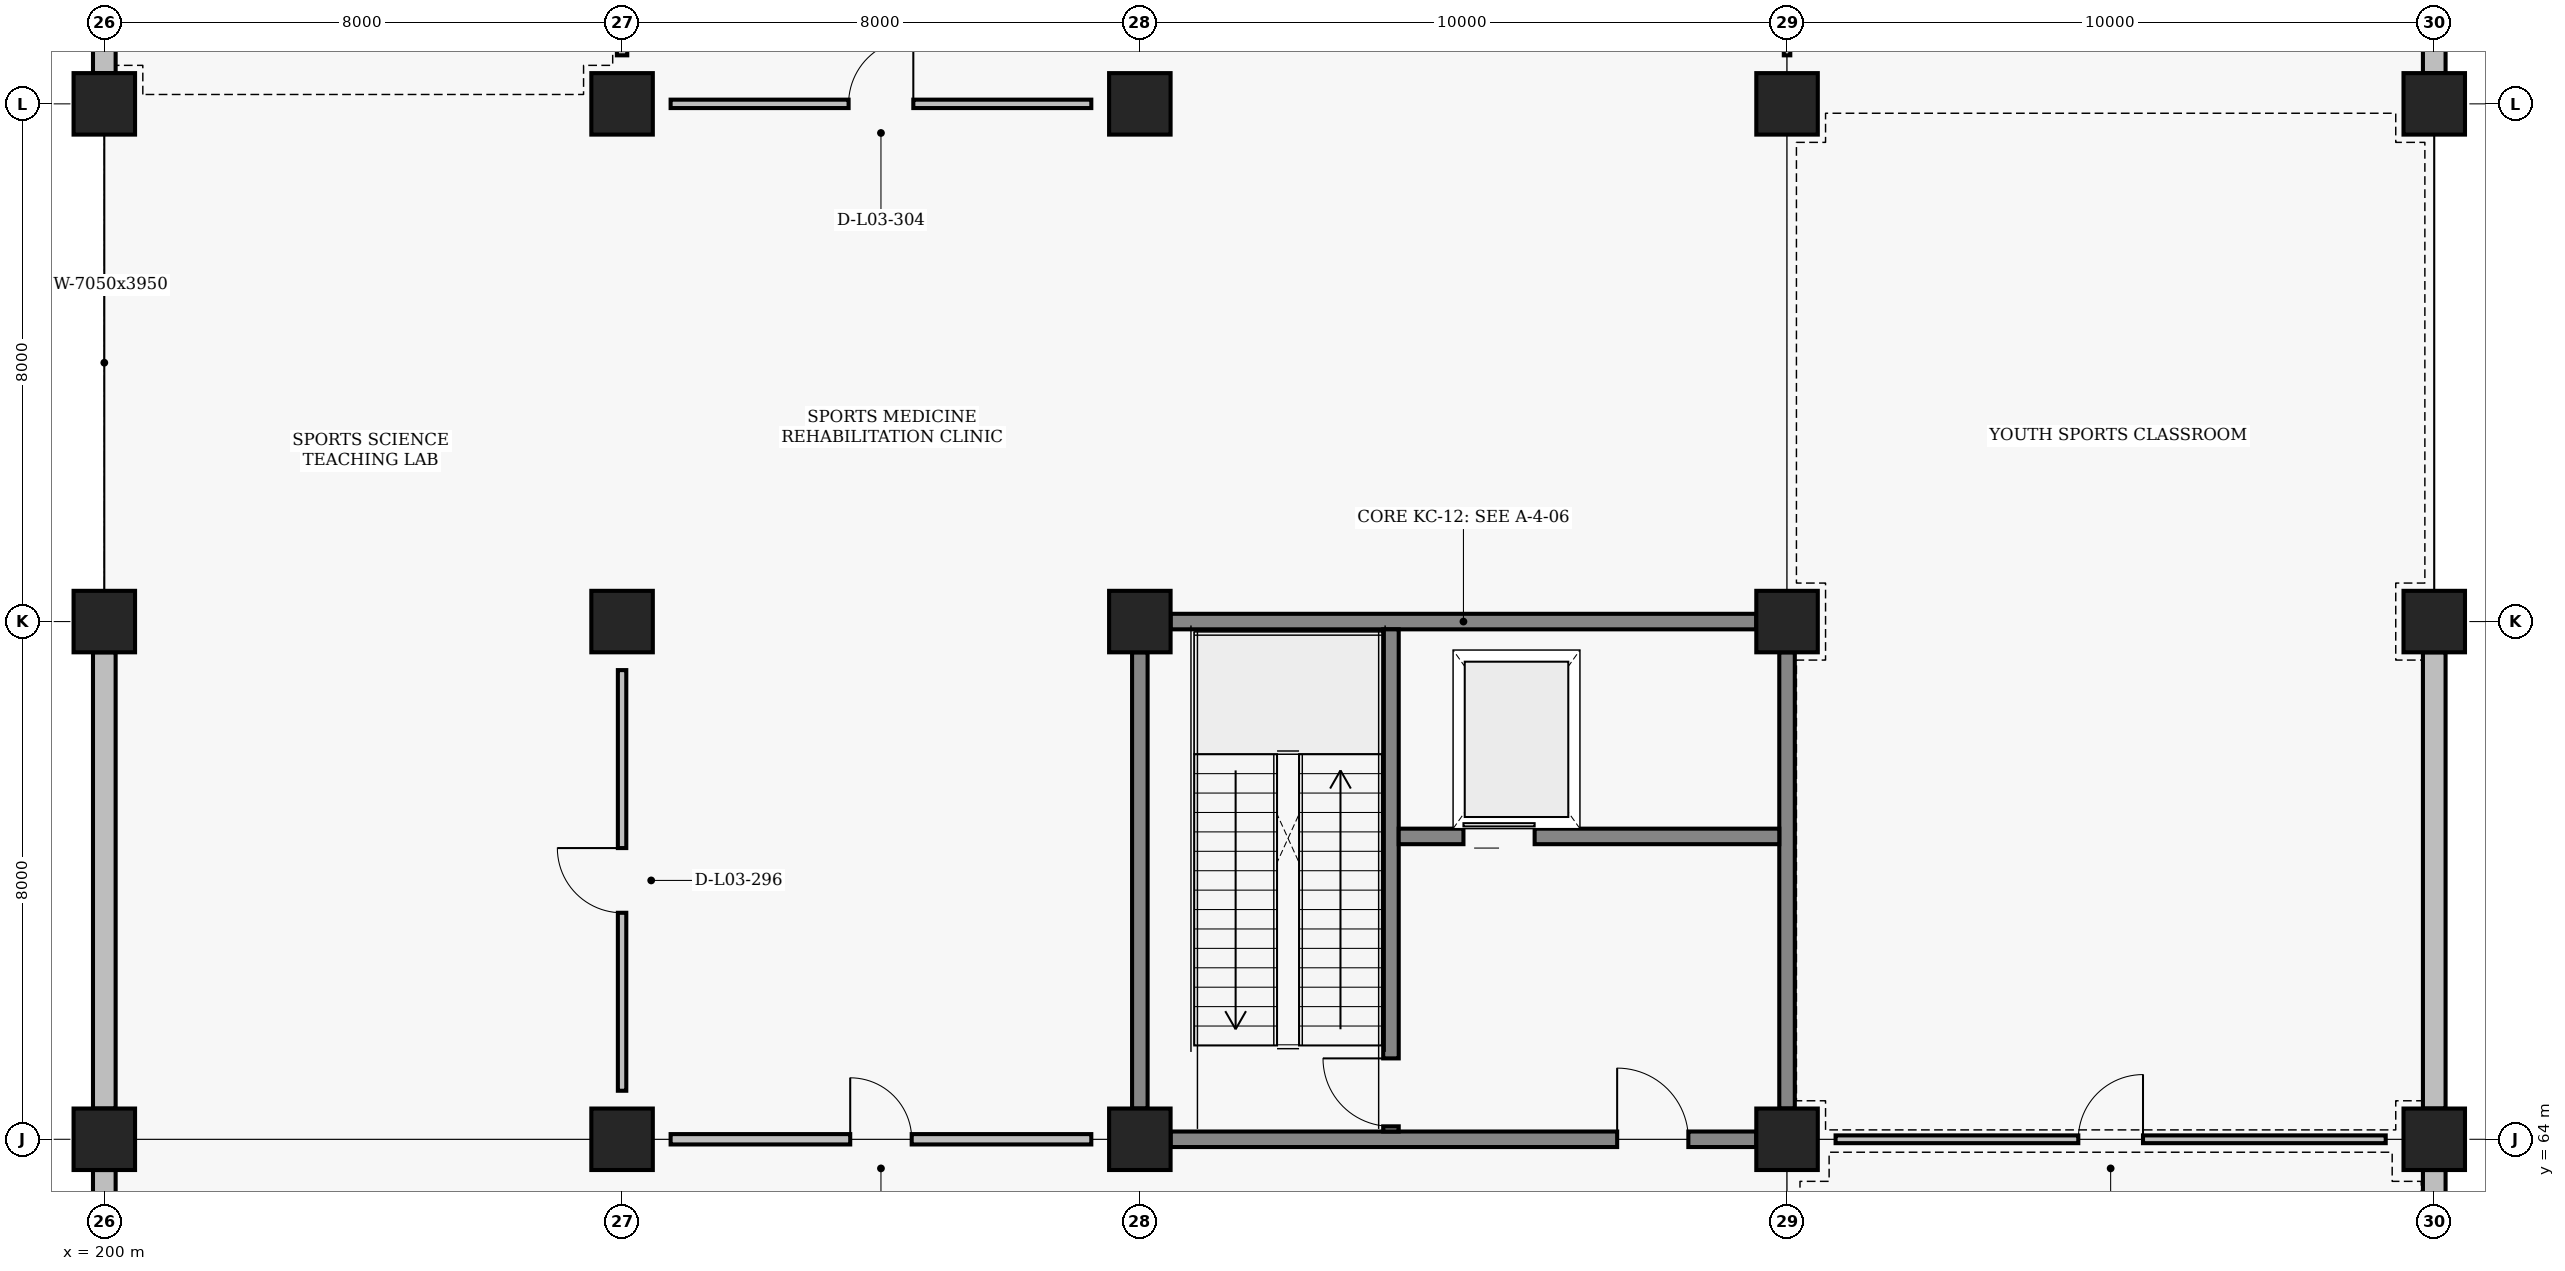
"""IFC4 building model, lengths in metres.
Left out: names, types, materials, properties, quantities, classifications, styles, units other than length and angle.
Written with IfcOpenShell. Run it as: python <this file> out.ifc"""

import sys

from ifc_helpers import new_model, si_unit, direction, frame, frame_2d, origin, origin_2d, place, context, subcontext, project, spatial, rectangle, extrude, element, fill, save


model = new_model("IFC4")
c1 = context("Model", 3, precision=1e-05, world=origin(), true_north=direction((0.0, 1.0)))
c2 = subcontext(c1, "Body", "Model", "MODEL_VIEW")
j1 = project(units=[si_unit("LENGTHUNIT", "METRE"), si_unit("PLANEANGLEUNIT", "RADIAN")], contexts=[c1])
p1 = place(None, origin())
s1 = spatial("IfcSite", under=j1, at=p1, CompositionType="ELEMENT")
p2 = place(p1, origin())
s2 = spatial("IfcBuilding", under=s1, at=p2, CompositionType="ELEMENT")
p3 = place(p2, frame((0.0, 0.0, 9.6)))
s3 = spatial("IfcBuildingStorey", under=s2, at=p3, CompositionType="ELEMENT", Elevation=9.6)
for number, where, z_axis, x_axis in (
    (1, (200.0, 64.0, 0.0), (0.0, 0.0, 1.0), (1.0, 0.0, 0.0)),
    (2, (200.0, 72.0, 0.0), (0.0, 0.0, 1.0), (1.0, 0.0, 0.0)),
    (3, (200.0, 80.0, 0.0), (0.0, 0.0, 1.0), (1.0, 0.0, 0.0)),
    (4, (208.0, 64.0, 0.0), (0.0, 0.0, 1.0), (1.0, 0.0, 0.0)),
    (5, (208.0, 72.0, 0.0), (0.0, 0.0, 1.0), (1.0, 0.0, 0.0)),
    (6, (208.0, 80.0, 0.0), (0.0, 0.0, 1.0), (1.0, 0.0, 0.0)),
    (7, (216.0, 64.0, 0.0), (0.0, 0.0, 1.0), (1.0, 0.0, 0.0)),
    (8, (216.0, 72.0, 0.0), (0.0, 0.0, 1.0), (1.0, 0.0, 0.0)),
    (9, (216.0, 80.0, 0.0), (0.0, 0.0, 1.0), (1.0, 0.0, 0.0)),
    (10, (226.0, 64.0, 0.0), (0.0, 0.0, 1.0), (1.0, 0.0, 0.0)),
    (11, (226.0, 72.0, 0.0), (0.0, 0.0, 1.0), (1.0, 0.0, 0.0)),
    (12, (226.0, 80.0, 0.0), (0.0, 0.0, 1.0), (1.0, 0.0, 0.0)),
    (13, (236.0, 64.0, 0.0), (0.0, 0.0, 1.0), (1.0, 0.0, 0.0)),
    (14, (236.0, 72.0, 0.0), (0.0, 0.0, 1.0), (1.0, 0.0, 0.0)),
    (15, (236.0, 80.0, 0.0), (0.0, 0.0, 1.0), (1.0, 0.0, 0.0)),
):
    element("IfcColumn", number, at=place(p3, frame(where, z_axis=z_axis, x_axis=x_axis)), inside=s3, PredefinedType="COLUMN", context=c2, shape_type="SweptSolid", body=[
        extrude(rectangle(XDim=0.95, YDim=0.95, at=origin_2d()), origin(), (0.0, 0.0, 1.0), 4.8),
    ])
p4 = place(p3, frame((200.0, 56.475, 0.0), z_axis=(0.0, 0.0, 1.0), x_axis=(0.0, 1.0, 0.0)))
e16 = element("IfcWall", 16, at=p4, inside=s3, PredefinedType="SOLIDWALL", context=c2, shape_type="SweptSolid", body=[
    extrude(rectangle(XDim=7.05, YDim=0.35, at=frame_2d((3.525, 0.0))), origin(), (0.0, 0.0, 1.0), 3.72),
])
p5 = place(p4, frame((2.85, 0.0, 0.95)))
e17 = element("IfcOpeningElement", 17, at=p5, cuts=e16, PredefinedType="OPENING", context=c2, shape_type="SweptSolid", body=[
    extrude(rectangle(XDim=1.35, YDim=1.6, at=frame_2d((0.675, 0.8))), frame((0.0, 0.185, 0.0), z_axis=(0.0, -1.0, 0.0), x_axis=(1.0, 0.0, 0.0)), (0.0, 0.0, 1.0), 0.37),
])
for number, where, z_axis, x_axis in (
    (18, (200.0, 64.475, 0.0), (0.0, 0.0, 1.0), (0.0, 1.0, 0.0)),
    (19, (200.0, 80.475, 0.0), (0.0, 0.0, 1.0), (0.0, 1.0, 0.0)),
):
    element("IfcWall", number, at=place(p3, frame(where, z_axis=z_axis, x_axis=x_axis)), inside=s3, PredefinedType="SOLIDWALL", context=c2, shape_type="SweptSolid", body=[
        extrude(rectangle(XDim=7.05, YDim=0.35, at=frame_2d((3.525, 0.0))), origin(), (0.0, 0.0, 1.0), 3.95),
    ])
for number, where, z_axis, x_axis in (
    (20, (236.0, 56.475, 0.0), (0.0, 0.0, 1.0), (0.0, 1.0, 0.0)),
    (21, (236.0, 64.475, 0.0), (0.0, 0.0, 1.0), (0.0, 1.0, 0.0)),
    (22, (236.0, 80.475, 0.0), (0.0, 0.0, 1.0), (0.0, 1.0, 0.0)),
):
    element("IfcWall", number, at=place(p3, frame(where, z_axis=z_axis, x_axis=x_axis)), inside=s3, PredefinedType="SOLIDWALL", context=c2, shape_type="SweptSolid", body=[
        extrude(rectangle(XDim=7.05, YDim=0.35, at=frame_2d((3.525, 0.0))), origin(), (0.0, 0.0, 1.0), 3.83),
    ])
p6 = place(p3, frame((216.475, 64.0, 0.0), z_axis=(0.0, 0.0, 1.0), x_axis=(1.0, 0.0, 0.0)))
e23 = element("IfcWall", 23, at=p6, inside=s3, PredefinedType="SHEAR", context=c2, shape_type="SweptSolid", body=[
    extrude(rectangle(XDim=9.05, YDim=0.24, at=frame_2d((4.525, 0.0))), origin(), (0.0, 0.0, 1.0), 3.83),
])
p7 = place(p6, frame((6.9, 0.0, 0.0)))
e24 = element("IfcOpeningElement", 24, at=p7, cuts=e23, PredefinedType="OPENING", context=c2, shape_type="SweptSolid", body=[
    extrude(rectangle(XDim=1.1, YDim=2.2, at=frame_2d((0.55, 1.1))), frame((0.0, 0.13, 0.0), z_axis=(0.0, -1.0, 0.0), x_axis=(1.0, 0.0, 0.0)), (0.0, 0.0, 1.0), 0.26),
])
p8 = place(p3, frame((216.475, 72.0, 0.0), z_axis=(0.0, 0.0, 1.0), x_axis=(1.0, 0.0, 0.0)))
e25 = element("IfcWall", 25, at=p8, inside=s3, PredefinedType="SHEAR", context=c2, shape_type="SweptSolid", body=[
    extrude(rectangle(XDim=9.05, YDim=0.24, at=frame_2d((4.525, 0.0))), origin(), (0.0, 0.0, 1.0), 3.83),
])
p9 = place(p3, frame((216.0, 64.475, 0.0), z_axis=(0.0, 0.0, 1.0), x_axis=(0.0, 1.0, 0.0)))
e26 = element("IfcWall", 26, at=p9, inside=s3, PredefinedType="SHEAR", context=c2, shape_type="SweptSolid", body=[
    extrude(rectangle(XDim=7.05, YDim=0.24, at=frame_2d((3.525, 0.0))), origin(), (0.0, 0.0, 1.0), 3.93),
])
p10 = place(p3, frame((226.0, 64.475, 0.0), z_axis=(0.0, 0.0, 1.0), x_axis=(0.0, 1.0, 0.0)))
e27 = element("IfcWall", 27, at=p10, inside=s3, PredefinedType="SHEAR", context=c2, shape_type="SweptSolid", body=[
    extrude(rectangle(XDim=7.05, YDim=0.24, at=frame_2d((3.525, 0.0))), origin(), (0.0, 0.0, 1.0), 3.83),
])
p11 = place(p3, frame((219.88, 64.12, 0.0), z_axis=(0.0, 0.0, 1.0), x_axis=(0.0, 1.0, 0.0)))
e28 = element("IfcWall", 28, at=p11, inside=s3, PredefinedType="SHEAR", context=c2, shape_type="SweptSolid", body=[
    extrude(rectangle(XDim=7.76, YDim=0.24, at=frame_2d((3.88, 0.0))), origin(), (0.0, 0.0, 1.0), 4.03),
])
p12 = place(p11, frame((0.08, 0.0, 0.0)))
e29 = element("IfcOpeningElement", 29, at=p12, cuts=e28, PredefinedType="OPENING", context=c2, shape_type="SweptSolid", body=[
    extrude(rectangle(XDim=1.05, YDim=2.15, at=frame_2d((0.525, 1.075))), frame((0.0, 0.13, 0.0), z_axis=(0.0, -1.0, 0.0), x_axis=(1.0, 0.0, 0.0)), (0.0, 0.0, 1.0), 0.26),
])
p13 = place(p3, frame((220.0, 68.68, 0.0), z_axis=(0.0, 0.0, 1.0), x_axis=(1.0, 0.0, 0.0)))
e30 = element("IfcWall", 30, at=p13, inside=s3, PredefinedType="SHEAR", context=c2, shape_type="SweptSolid", body=[
    extrude(rectangle(XDim=5.88, YDim=0.24, at=frame_2d((2.94, 0.0))), origin(), (0.0, 0.0, 1.0), 3.93),
])
p14 = place(p13, frame((1.0, 0.0, 0.0)))
e31 = element("IfcOpeningElement", 31, at=p14, cuts=e30, PredefinedType="OPENING", context=c2, shape_type="SweptSolid", body=[
    extrude(rectangle(XDim=1.1, YDim=2.15, at=frame_2d((0.55, 1.075))), frame((0.0, 0.13, 0.0), z_axis=(0.0, -1.0, 0.0), x_axis=(1.0, 0.0, 0.0)), (0.0, 0.0, 1.0), 0.26),
])
p15 = place(p3, frame((208.0, 64.75, 0.0), z_axis=(0.0, 0.0, 1.0), x_axis=(0.0, 1.0, 0.0)))
e32 = element("IfcWall", 32, at=p15, inside=s3, PredefinedType="PARTITIONING", context=c2, shape_type="SweptSolid", body=[
    extrude(rectangle(XDim=6.5, YDim=0.13, at=frame_2d((3.25, 0.0))), origin(), (0.0, 0.0, 1.0), 3.93),
])
p16 = place(p15, frame((2.75, 0.0, 0.0)))
e33 = element("IfcOpeningElement", 33, at=p16, cuts=e32, PredefinedType="OPENING", context=c2, shape_type="SweptSolid", body=[
    extrude(rectangle(XDim=1.0, YDim=2.1, at=frame_2d((0.5, 1.05))), frame((0.0, 0.075, 0.0), z_axis=(0.0, -1.0, 0.0), x_axis=(1.0, 0.0, 0.0)), (0.0, 0.0, 1.0), 0.15),
])
p17 = place(p3, frame((208.0, 80.75, 0.0), z_axis=(0.0, 0.0, 1.0), x_axis=(0.0, 1.0, 0.0)))
e34 = element("IfcWall", 34, at=p17, inside=s3, PredefinedType="PARTITIONING", context=c2, shape_type="SweptSolid", body=[
    extrude(rectangle(XDim=6.5, YDim=0.16, at=frame_2d((3.25, 0.0))), origin(), (0.0, 0.0, 1.0), 3.93),
])
p18 = place(p17, frame((2.775, 0.0, 0.0)))
e35 = element("IfcOpeningElement", 35, at=p18, cuts=e34, PredefinedType="OPENING", context=c2, shape_type="SweptSolid", body=[
    extrude(rectangle(XDim=0.95, YDim=2.1, at=frame_2d((0.475, 1.05))), frame((0.0, 0.09, 0.0), z_axis=(0.0, -1.0, 0.0), x_axis=(1.0, 0.0, 0.0)), (0.0, 0.0, 1.0), 0.18),
])
p19 = place(p3, frame((208.75, 64.0, 0.0), z_axis=(0.0, 0.0, 1.0), x_axis=(1.0, 0.0, 0.0)))
e36 = element("IfcWall", 36, at=p19, inside=s3, PredefinedType="PARTITIONING", context=c2, shape_type="SweptSolid", body=[
    extrude(rectangle(XDim=6.5, YDim=0.16, at=frame_2d((3.25, 0.0))), origin(), (0.0, 0.0, 1.0), 3.93),
])
p20 = place(p19, frame((2.775, 0.0, 0.0)))
e37 = element("IfcOpeningElement", 37, at=p20, cuts=e36, PredefinedType="OPENING", context=c2, shape_type="SweptSolid", body=[
    extrude(rectangle(XDim=0.95, YDim=2.1, at=frame_2d((0.475, 1.05))), frame((0.0, 0.09, 0.0), z_axis=(0.0, -1.0, 0.0), x_axis=(1.0, 0.0, 0.0)), (0.0, 0.0, 1.0), 0.18),
])
p21 = place(p3, frame((208.75, 80.0, 0.0), z_axis=(0.0, 0.0, 1.0), x_axis=(1.0, 0.0, 0.0)))
e38 = element("IfcWall", 38, at=p21, inside=s3, PredefinedType="PARTITIONING", context=c2, shape_type="SweptSolid", body=[
    extrude(rectangle(XDim=6.5, YDim=0.13, at=frame_2d((3.25, 0.0))), origin(), (0.0, 0.0, 1.0), 3.93),
])
p22 = place(p21, frame((2.75, 0.0, 0.0)))
e39 = element("IfcOpeningElement", 39, at=p22, cuts=e38, PredefinedType="OPENING", context=c2, shape_type="SweptSolid", body=[
    extrude(rectangle(XDim=1.0, YDim=2.1, at=frame_2d((0.5, 1.05))), frame((0.0, 0.075, 0.0), z_axis=(0.0, -1.0, 0.0), x_axis=(1.0, 0.0, 0.0)), (0.0, 0.0, 1.0), 0.15),
])
p23 = place(p3, frame((226.75, 64.0, 0.0), z_axis=(0.0, 0.0, 1.0), x_axis=(1.0, 0.0, 0.0)))
e40 = element("IfcWall", 40, at=p23, inside=s3, PredefinedType="PARTITIONING", context=c2, shape_type="SweptSolid", body=[
    extrude(rectangle(XDim=8.5, YDim=0.12, at=frame_2d((4.25, 0.0))), origin(), (0.0, 0.0, 1.0), 3.83),
])
p24 = place(p23, frame((3.75, 0.0, 0.0)))
e41 = element("IfcOpeningElement", 41, at=p24, cuts=e40, PredefinedType="OPENING", context=c2, shape_type="SweptSolid", body=[
    extrude(rectangle(XDim=1.0, YDim=2.1, at=frame_2d((0.5, 1.05))), frame((0.0, 0.07, 0.0), z_axis=(0.0, -1.0, 0.0), x_axis=(1.0, 0.0, 0.0)), (0.0, 0.0, 1.0), 0.14),
])
p25 = place(p3, frame((226.0, 80.75, 0.0), z_axis=(0.0, 0.0, 1.0), x_axis=(0.0, 1.0, 0.0)))
e42 = element("IfcWall", 42, at=p25, inside=s3, PredefinedType="PARTITIONING", context=c2, shape_type="SweptSolid", body=[
    extrude(rectangle(XDim=6.5, YDim=0.1, at=frame_2d((3.25, 0.0))), origin(), (0.0, 0.0, 1.0), 3.93),
])
p26 = place(p25, frame((2.775, 0.0, 0.0)))
e43 = element("IfcOpeningElement", 43, at=p26, cuts=e42, PredefinedType="OPENING", context=c2, shape_type="SweptSolid", body=[
    extrude(rectangle(XDim=0.95, YDim=2.1, at=frame_2d((0.475, 1.05))), frame((0.0, 0.06, 0.0), z_axis=(0.0, -1.0, 0.0), x_axis=(1.0, 0.0, 0.0)), (0.0, 0.0, 1.0), 0.12),
])
p27 = place(p7, origin())
e44 = element("IfcDoor", 44, at=p27, inside=s3, OperationType="SINGLE_SWING_LEFT", PredefinedType="DOOR", context=c2, shape_type="SweptSolid", body=[
    extrude(rectangle(XDim=1.1, YDim=2.2, at=frame_2d((0.55, 1.1))), frame((0.0, 0.025, 0.0), z_axis=(0.0, -1.0, 0.0), x_axis=(1.0, 0.0, 0.0)), (0.0, 0.0, 1.0), 0.05),
])
fill(e24, e44)
p28 = place(p12, origin())
e45 = element("IfcDoor", 45, at=p28, inside=s3, OperationType="SINGLE_SWING_RIGHT", PredefinedType="DOOR", context=c2, shape_type="SweptSolid", body=[
    extrude(rectangle(XDim=1.05, YDim=2.15, at=frame_2d((0.525, 1.075))), frame((0.0, 0.025, 0.0), z_axis=(0.0, -1.0, 0.0), x_axis=(1.0, 0.0, 0.0)), (0.0, 0.0, 1.0), 0.05),
])
fill(e29, e45)
p29 = place(p14, origin())
e46 = element("IfcDoor", 46, at=p29, inside=s3, OperationType="SLIDING_TO_LEFT", PredefinedType="DOOR", context=c2, shape_type="SweptSolid", body=[
    extrude(rectangle(XDim=1.1, YDim=2.15, at=frame_2d((0.55, 1.075))), frame((0.0, 0.025, 0.0), z_axis=(0.0, -1.0, 0.0), x_axis=(1.0, 0.0, 0.0)), (0.0, 0.0, 1.0), 0.05),
])
fill(e31, e46)
p30 = place(p16, origin())
e47 = element("IfcDoor", 47, at=p30, inside=s3, OperationType="SINGLE_SWING_RIGHT", PredefinedType="DOOR", context=c2, shape_type="SweptSolid", body=[
    extrude(rectangle(XDim=1.0, YDim=2.1, at=frame_2d((0.5, 1.05))), frame((0.0, 0.025, 0.0), z_axis=(0.0, -1.0, 0.0), x_axis=(1.0, 0.0, 0.0)), (0.0, 0.0, 1.0), 0.05),
])
fill(e33, e47)
p31 = place(p20, origin())
e48 = element("IfcDoor", 48, at=p31, inside=s3, OperationType="SINGLE_SWING_LEFT", PredefinedType="DOOR", context=c2, shape_type="SweptSolid", body=[
    extrude(rectangle(XDim=0.95, YDim=2.1, at=frame_2d((0.475, 1.05))), frame((0.0, 0.025, 0.0), z_axis=(0.0, -1.0, 0.0), x_axis=(1.0, 0.0, 0.0)), (0.0, 0.0, 1.0), 0.05),
])
fill(e37, e48)
p32 = place(p22, origin())
e49 = element("IfcDoor", 49, at=p32, inside=s3, OperationType="SINGLE_SWING_RIGHT", PredefinedType="DOOR", context=c2, shape_type="SweptSolid", body=[
    extrude(rectangle(XDim=1.0, YDim=2.1, at=frame_2d((0.5, 1.05))), frame((0.0, 0.025, 0.0), z_axis=(0.0, -1.0, 0.0), x_axis=(1.0, 0.0, 0.0)), (0.0, 0.0, 1.0), 0.05),
])
fill(e39, e49)
p33 = place(p24, origin())
e50 = element("IfcDoor", 50, at=p33, inside=s3, OperationType="SINGLE_SWING_RIGHT", PredefinedType="DOOR", context=c2, shape_type="SweptSolid", body=[
    extrude(rectangle(XDim=1.0, YDim=2.1, at=frame_2d((0.5, 1.05))), frame((0.0, 0.025, 0.0), z_axis=(0.0, -1.0, 0.0), x_axis=(1.0, 0.0, 0.0)), (0.0, 0.0, 1.0), 0.05),
])
fill(e41, e50)
save(model, sys.argv[1])
